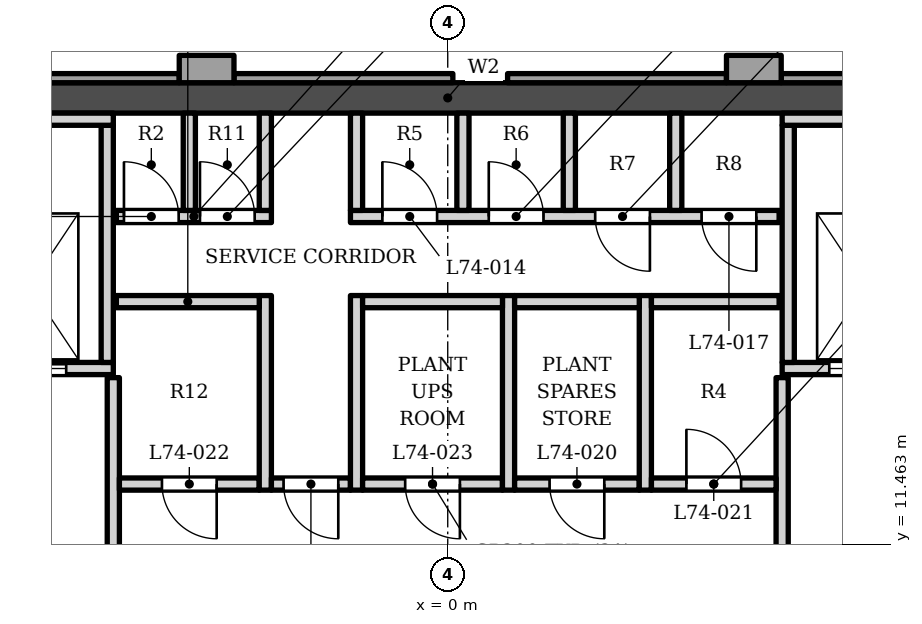
"""IFC4 building model, lengths in metres.
Left out: names, types, materials, properties, quantities, classifications, styles, units other than length and angle.
Written with IfcOpenShell. Run it as: python <this file> out.ifc"""

import sys

from ifc_helpers import new_model, si_unit, direction, frame, frame_2d, origin, place, context, subcontext, project, spatial, polyline, rectangle, outline, extrude, element, fill, save


model = new_model("IFC4")
c1 = context("Model", 3, precision=1e-05, world=origin(), true_north=direction((0.0, 1.0)))
c2 = subcontext(c1, "Body", "Model", "MODEL_VIEW")
j1 = project(units=[si_unit("LENGTHUNIT", "METRE"), si_unit("PLANEANGLEUNIT", "RADIAN")], contexts=[c1])
p1 = place(None, origin())
s1 = spatial("IfcSite", under=j1, at=p1, CompositionType="ELEMENT")
p2 = place(p1, origin())
s2 = spatial("IfcBuilding", under=s1, at=p2, CompositionType="ELEMENT")
p3 = place(p2, frame((0.0, 0.0, 315.5)))
s3 = spatial("IfcBuildingStorey", under=s2, at=p3, CompositionType="ELEMENT", Elevation=315.5)
p4 = place(p3, frame((-12.1, 18.802, 0.0), z_axis=(0.0, 0.0, 1.0), x_axis=(1.0, 0.0, 0.0)))
e1 = element("IfcWall", 1, at=p4, inside=s3, PredefinedType="SHEAR", context=c2, shape_type="SweptSolid", body=[
    extrude(rectangle(XDim=24.2, YDim=0.5, at=frame_2d((12.1, 0.0))), origin(), (0.0, 0.0, 1.0), 5.0),
])
p5 = place(p3, origin())
e2 = element("IfcWall", 2, at=p5, inside=s3, PredefinedType="SOLIDWALL", context=c2, shape_type="SweptSolid", body=[
    extrude(outline(polyline([(4.584, 19.502), (4.584, 19.052), (5.484, 19.052), (5.484, 19.502), (4.584, 19.502)])), origin(), (0.0, 0.0, 1.0), 3.8),
])
p6 = place(p3, origin())
e3 = element("IfcWall", 3, at=p6, inside=s3, PredefinedType="SOLIDWALL", context=c2, shape_type="SweptSolid", body=[
    extrude(outline(polyline([(-4.416, 19.502), (-4.416, 19.052), (-3.516, 19.052), (-3.516, 19.502), (-4.416, 19.502)])), origin(), (0.0, 0.0, 1.0), 3.8),
])
p7 = place(p3, origin())
e4 = element("IfcWall", 4, at=p7, inside=s3, PredefinedType="ELEMENTEDWALL", context=c2, shape_type="SweptSolid", body=[
    extrude(outline(polyline([(9.084, 19.203), (5.484, 19.203), (5.484, 19.052), (9.084, 19.052), (9.084, 19.203)])), origin(), (0.0, 0.0, 1.0), 3.8),
])
p8 = place(p3, origin())
e5 = element("IfcWall", 5, at=p8, inside=s3, PredefinedType="ELEMENTEDWALL", context=c2, shape_type="SweptSolid", body=[
    extrude(outline(polyline([(4.584, 19.203), (0.984, 19.203), (0.984, 19.052), (4.584, 19.052), (4.584, 19.203)])), origin(), (0.0, 0.0, 1.0), 3.8),
])
p9 = place(p3, origin())
e6 = element("IfcWall", 6, at=p9, inside=s3, PredefinedType="ELEMENTEDWALL", context=c2, shape_type="SweptSolid", body=[
    extrude(outline(polyline([(0.084, 19.203), (-3.516, 19.203), (-3.516, 19.052), (0.084, 19.052), (0.084, 19.203)])), origin(), (0.0, 0.0, 1.0), 3.8),
])
p10 = place(p3, origin())
e7 = element("IfcWall", 7, at=p10, inside=s3, PredefinedType="ELEMENTEDWALL", context=c2, shape_type="SweptSolid", body=[
    extrude(outline(polyline([(-4.416, 19.203), (-8.016, 19.203), (-8.016, 19.052), (-4.416, 19.052), (-4.416, 19.203)])), origin(), (0.0, 0.0, 1.0), 3.8),
])
p11 = place(p3, frame((-5.5, 6.353, 0.0), z_axis=(0.0, 0.0, 1.0), x_axis=(0.0, 1.0, 0.0)))
e8 = element("IfcWall", 8, at=p11, inside=s3, PredefinedType="SOLIDWALL", context=c2, shape_type="SweptSolid", body=[
    extrude(rectangle(XDim=7.85, YDim=0.2, at=frame_2d((3.925, 0.0))), origin(), (0.0, 0.0, 1.0), 4.8),
])
p12 = place(p11, frame((3.6, 0.0, 0.0)))
e9 = element("IfcOpeningElement", 9, at=p12, cuts=e8, PredefinedType="OPENING", context=c2, shape_type="SweptSolid", body=[
    extrude(rectangle(XDim=1.4, YDim=2.1, at=frame_2d((0.7, 1.05))), frame((0.0, 0.11, 0.0), z_axis=(0.0, -1.0, 0.0), x_axis=(1.0, 0.0, 0.0)), (0.0, 0.0, 1.0), 0.22),
])
p13 = place(p3, frame((5.5, 6.353, 0.0), z_axis=(0.0, 0.0, 1.0), x_axis=(0.0, 1.0, 0.0)))
e10 = element("IfcWall", 10, at=p13, inside=s3, PredefinedType="SOLIDWALL", context=c2, shape_type="SweptSolid", body=[
    extrude(rectangle(XDim=7.85, YDim=0.2, at=frame_2d((3.925, 0.0))), origin(), (0.0, 0.0, 1.0), 4.8),
])
p14 = place(p13, frame((3.6, 0.0, 0.0)))
e11 = element("IfcOpeningElement", 11, at=p14, cuts=e10, PredefinedType="OPENING", context=c2, shape_type="SweptSolid", body=[
    extrude(rectangle(XDim=1.4, YDim=2.1, at=frame_2d((0.7, 1.05))), frame((0.0, 0.11, 0.0), z_axis=(0.0, -1.0, 0.0), x_axis=(1.0, 0.0, 0.0)), (0.0, 0.0, 1.0), 0.22),
])
p15 = place(p3, frame((-5.4, 12.453, 0.0), z_axis=(0.0, 0.0, 1.0), x_axis=(1.0, 0.0, 0.0)))
e12 = element("IfcWall", 12, at=p15, inside=s3, PredefinedType="PARTITIONING", context=c2, shape_type="SweptSolid", body=[
    extrude(rectangle(XDim=2.3, YDim=0.2, at=frame_2d((1.15, 0.0))), origin(), (0.0, 0.0, 1.0), 4.8),
])
p16 = place(p15, frame((0.7, 0.0, 0.0)))
e13 = element("IfcOpeningElement", 13, at=p16, cuts=e12, PredefinedType="OPENING", context=c2, shape_type="SweptSolid", body=[
    extrude(rectangle(XDim=0.9, YDim=2.1, at=frame_2d((0.45, 1.05))), frame((0.0, 0.11, 0.0), z_axis=(0.0, -1.0, 0.0), x_axis=(1.0, 0.0, 0.0)), (0.0, 0.0, 1.0), 0.22),
])
p17 = place(p3, frame((-3.0, 12.353, 0.0), z_axis=(0.0, 0.0, 1.0), x_axis=(0.0, 1.0, 0.0)))
e14 = element("IfcWall", 14, at=p17, inside=s3, PredefinedType="PARTITIONING", context=c2, shape_type="SweptSolid", body=[
    extrude(rectangle(XDim=3.2, YDim=0.2, at=frame_2d((1.6, 0.0))), origin(), (0.0, 0.0, 1.0), 4.8),
])
p18 = place(p3, frame((-2.9, 12.453, 0.0), z_axis=(0.0, 0.0, 1.0), x_axis=(1.0, 0.0, 0.0)))
e15 = element("IfcWall", 15, at=p18, inside=s3, PredefinedType="PARTITIONING", context=c2, shape_type="SweptSolid", body=[
    extrude(rectangle(XDim=1.3, YDim=0.2, at=frame_2d((0.65, 0.0))), origin(), (0.0, 0.0, 1.0), 4.8),
])
p19 = place(p18, frame((0.2, 0.0, 0.0)))
e16 = element("IfcOpeningElement", 16, at=p19, cuts=e15, PredefinedType="OPENING", context=c2, shape_type="SweptSolid", body=[
    extrude(rectangle(XDim=0.9, YDim=2.1, at=frame_2d((0.45, 1.05))), frame((0.0, 0.11, 0.0), z_axis=(0.0, -1.0, 0.0), x_axis=(1.0, 0.0, 0.0)), (0.0, 0.0, 1.0), 0.22),
])
p20 = place(p3, frame((-1.5, 12.353, 0.0), z_axis=(0.0, 0.0, 1.0), x_axis=(0.0, 1.0, 0.0)))
e17 = element("IfcWall", 17, at=p20, inside=s3, PredefinedType="PARTITIONING", context=c2, shape_type="SweptSolid", body=[
    extrude(rectangle(XDim=3.2, YDim=0.2, at=frame_2d((1.6, 0.0))), origin(), (0.0, 0.0, 1.0), 4.8),
])
p21 = place(p3, frame((-1.4, 12.453, 0.0), z_axis=(0.0, 0.0, 1.0), x_axis=(1.0, 0.0, 0.0)))
e18 = element("IfcWall", 18, at=p21, inside=s3, PredefinedType="PARTITIONING", context=c2, shape_type="SweptSolid", body=[
    extrude(rectangle(XDim=2.3, YDim=0.2, at=frame_2d((1.15, 0.0))), origin(), (0.0, 0.0, 1.0), 4.8),
])
p22 = place(p21, frame((0.7, 0.0, 0.0)))
e19 = element("IfcOpeningElement", 19, at=p22, cuts=e18, PredefinedType="OPENING", context=c2, shape_type="SweptSolid", body=[
    extrude(rectangle(XDim=0.9, YDim=2.1, at=frame_2d((0.45, 1.05))), frame((0.0, 0.11, 0.0), z_axis=(0.0, -1.0, 0.0), x_axis=(1.0, 0.0, 0.0)), (0.0, 0.0, 1.0), 0.22),
])
p23 = place(p3, frame((1.0, 12.353, 0.0), z_axis=(0.0, 0.0, 1.0), x_axis=(0.0, 1.0, 0.0)))
e20 = element("IfcWall", 20, at=p23, inside=s3, PredefinedType="PARTITIONING", context=c2, shape_type="SweptSolid", body=[
    extrude(rectangle(XDim=3.2, YDim=0.2, at=frame_2d((1.6, 0.0))), origin(), (0.0, 0.0, 1.0), 4.8),
])
p24 = place(p3, frame((1.1, 12.453, 0.0), z_axis=(0.0, 0.0, 1.0), x_axis=(1.0, 0.0, 0.0)))
e21 = element("IfcWall", 21, at=p24, inside=s3, PredefinedType="PARTITIONING", context=c2, shape_type="SweptSolid", body=[
    extrude(rectangle(XDim=2.05, YDim=0.2, at=frame_2d((1.025, 0.0))), origin(), (0.0, 0.0, 1.0), 4.8),
])
p25 = place(p24, frame((0.575, 0.0, 0.0)))
e22 = element("IfcOpeningElement", 22, at=p25, cuts=e21, PredefinedType="OPENING", context=c2, shape_type="SweptSolid", body=[
    extrude(rectangle(XDim=0.9, YDim=2.1, at=frame_2d((0.45, 1.05))), frame((0.0, 0.11, 0.0), z_axis=(0.0, -1.0, 0.0), x_axis=(1.0, 0.0, 0.0)), (0.0, 0.0, 1.0), 0.22),
])
p26 = place(p3, frame((3.25, 12.353, 0.0), z_axis=(0.0, 0.0, 1.0), x_axis=(0.0, 1.0, 0.0)))
e23 = element("IfcWall", 23, at=p26, inside=s3, PredefinedType="PARTITIONING", context=c2, shape_type="SweptSolid", body=[
    extrude(rectangle(XDim=3.2, YDim=0.2, at=frame_2d((1.6, 0.0))), origin(), (0.0, 0.0, 1.0), 4.8),
])
p27 = place(p3, frame((3.35, 12.453, 0.0), z_axis=(0.0, 0.0, 1.0), x_axis=(1.0, 0.0, 0.0)))
e24 = element("IfcWall", 24, at=p27, inside=s3, PredefinedType="PARTITIONING", context=c2, shape_type="SweptSolid", body=[
    extrude(rectangle(XDim=2.05, YDim=0.2, at=frame_2d((1.025, 0.0))), origin(), (0.0, 0.0, 1.0), 4.8),
])
p28 = place(p27, frame((0.575, 0.0, 0.0)))
e25 = element("IfcOpeningElement", 25, at=p28, cuts=e24, PredefinedType="OPENING", context=c2, shape_type="SweptSolid", body=[
    extrude(rectangle(XDim=0.9, YDim=2.1, at=frame_2d((0.45, 1.05))), frame((0.0, 0.11, 0.0), z_axis=(0.0, -1.0, 0.0), x_axis=(1.0, 0.0, 0.0)), (0.0, 0.0, 1.0), 0.22),
])
p29 = place(p3, frame((-8.05, 14.353, 0.0), z_axis=(0.0, 0.0, 1.0), x_axis=(1.0, 0.0, 0.0)))
e26 = element("IfcWall", 26, at=p29, inside=s3, PredefinedType="SOLIDWALL", context=c2, shape_type="SweptSolid", body=[
    extrude(rectangle(XDim=2.55, YDim=0.2, at=frame_2d((1.275, 0.0))), origin(), (0.0, 0.0, 1.0), 4.8),
])
p30 = place(p29, frame((0.575, 0.0, 0.0)))
e27 = element("IfcOpeningElement", 27, at=p30, cuts=e26, PredefinedType="OPENING", context=c2, shape_type="SweptSolid", body=[
    extrude(rectangle(XDim=1.2, YDim=2.1, at=frame_2d((0.6, 1.05))), frame((0.0, 0.11, 0.0), z_axis=(0.0, -1.0, 0.0), x_axis=(1.0, 0.0, 0.0)), (0.0, 0.0, 1.0), 0.22),
])
p31 = place(p3, frame((5.5, 14.353, 0.0), z_axis=(0.0, 0.0, 1.0), x_axis=(1.0, 0.0, 0.0)))
e28 = element("IfcWall", 28, at=p31, inside=s3, PredefinedType="SOLIDWALL", context=c2, shape_type="SweptSolid", body=[
    extrude(rectangle(XDim=2.55, YDim=0.2, at=frame_2d((1.275, 0.0))), origin(), (0.0, 0.0, 1.0), 4.8),
])
p32 = place(p31, frame((0.775, 0.0, 0.0)))
e29 = element("IfcOpeningElement", 29, at=p32, cuts=e28, PredefinedType="OPENING", context=c2, shape_type="SweptSolid", body=[
    extrude(rectangle(XDim=1.2, YDim=2.1, at=frame_2d((0.6, 1.05))), frame((0.0, 0.11, 0.0), z_axis=(0.0, -1.0, 0.0), x_axis=(1.0, 0.0, 0.0)), (0.0, 0.0, 1.0), 0.22),
])
for number, where, z_axis, x_axis in (
    (30, (-5.6, 14.453, 0.0), (0.0, 0.0, 1.0), (0.0, 1.0, 0.0)),
    (31, (5.6, 14.453, 0.0), (0.0, 0.0, 1.0), (0.0, 1.0, 0.0)),
):
    element("IfcWall", number, at=place(p3, frame(where, z_axis=z_axis, x_axis=x_axis)), inside=s3, PredefinedType="SOLIDWALL", context=c2, shape_type="SweptSolid", body=[
        extrude(rectangle(XDim=3.9, YDim=0.2, at=frame_2d((1.95, 0.0))), origin(), (0.0, 0.0, 1.0), 4.8),
    ])
p33 = place(p3, frame((-5.45, 15.453, 0.0), z_axis=(0.0, 0.0, 1.0), x_axis=(1.0, 0.0, 0.0)))
e32 = element("IfcWall", 32, at=p33, inside=s3, PredefinedType="SOLIDWALL", context=c2, shape_type="SweptSolid", body=[
    extrude(rectangle(XDim=2.35, YDim=0.2, at=frame_2d((1.175, 0.0))), origin(), (0.0, 0.0, 1.0), 4.8),
])
p34 = place(p3, frame((-1.4, 15.453, 0.0), z_axis=(0.0, 0.0, 1.0), x_axis=(1.0, 0.0, 0.0)))
e33 = element("IfcWall", 33, at=p34, inside=s3, PredefinedType="PARTITIONING", context=c2, shape_type="SweptSolid", body=[
    extrude(rectangle(XDim=2.3, YDim=0.2, at=frame_2d((1.15, 0.0))), origin(), (0.0, 0.0, 1.0), 4.8),
])
p35 = place(p3, frame((1.1, 15.453, 0.0), z_axis=(0.0, 0.0, 1.0), x_axis=(1.0, 0.0, 0.0)))
e34 = element("IfcWall", 34, at=p35, inside=s3, PredefinedType="PARTITIONING", context=c2, shape_type="SweptSolid", body=[
    extrude(rectangle(XDim=2.05, YDim=0.2, at=frame_2d((1.025, 0.0))), origin(), (0.0, 0.0, 1.0), 4.8),
])
p36 = place(p3, frame((3.35, 15.453, 0.0), z_axis=(0.0, 0.0, 1.0), x_axis=(1.0, 0.0, 0.0)))
e35 = element("IfcWall", 35, at=p36, inside=s3, PredefinedType="SOLIDWALL", context=c2, shape_type="SweptSolid", body=[
    extrude(rectangle(XDim=2.1, YDim=0.2, at=frame_2d((1.05, 0.0))), origin(), (0.0, 0.0, 1.0), 4.8),
])
p37 = place(p3, frame((-5.45, 16.853, 0.0), z_axis=(0.0, 0.0, 1.0), x_axis=(1.0, 0.0, 0.0)))
e36 = element("IfcWall", 36, at=p37, inside=s3, PredefinedType="SOLIDWALL", context=c2, shape_type="SweptSolid", body=[
    extrude(rectangle(XDim=2.55, YDim=0.2, at=frame_2d((1.275, 0.0))), origin(), (0.0, 0.0, 1.0), 4.8),
])
p38 = place(p37, frame((0.125, 0.0, 0.0)))
e37 = element("IfcOpeningElement", 37, at=p38, cuts=e36, PredefinedType="OPENING", context=c2, shape_type="SweptSolid", body=[
    extrude(rectangle(XDim=0.9, YDim=2.1, at=frame_2d((0.45, 1.05))), frame((0.0, 0.11, 0.0), z_axis=(0.0, -1.0, 0.0), x_axis=(1.0, 0.0, 0.0)), (0.0, 0.0, 1.0), 0.22),
])
p39 = place(p37, frame((1.375, 0.0, 0.0)))
e38 = element("IfcOpeningElement", 38, at=p39, cuts=e36, PredefinedType="OPENING", context=c2, shape_type="SweptSolid", body=[
    extrude(rectangle(XDim=0.9, YDim=2.1, at=frame_2d((0.45, 1.05))), frame((0.0, 0.11, 0.0), z_axis=(0.0, -1.0, 0.0), x_axis=(1.0, 0.0, 0.0)), (0.0, 0.0, 1.0), 0.22),
])
p40 = place(p3, frame((-1.6, 16.853, 0.0), z_axis=(0.0, 0.0, 1.0), x_axis=(1.0, 0.0, 0.0)))
e39 = element("IfcWall", 39, at=p40, inside=s3, PredefinedType="SOLIDWALL", context=c2, shape_type="SweptSolid", body=[
    extrude(rectangle(XDim=7.05, YDim=0.2, at=frame_2d((3.525, 0.0))), origin(), (0.0, 0.0, 1.0), 4.8),
])
p41 = place(p40, frame((0.525, 0.0, 0.0)))
e40 = element("IfcOpeningElement", 40, at=p41, cuts=e39, PredefinedType="OPENING", context=c2, shape_type="SweptSolid", body=[
    extrude(rectangle(XDim=0.9, YDim=2.1, at=frame_2d((0.45, 1.05))), frame((0.0, 0.11, 0.0), z_axis=(0.0, -1.0, 0.0), x_axis=(1.0, 0.0, 0.0)), (0.0, 0.0, 1.0), 0.22),
])
p42 = place(p40, frame((2.275, 0.0, 0.0)))
e41 = element("IfcOpeningElement", 41, at=p42, cuts=e39, PredefinedType="OPENING", context=c2, shape_type="SweptSolid", body=[
    extrude(rectangle(XDim=0.9, YDim=2.1, at=frame_2d((0.45, 1.05))), frame((0.0, 0.11, 0.0), z_axis=(0.0, -1.0, 0.0), x_axis=(1.0, 0.0, 0.0)), (0.0, 0.0, 1.0), 0.22),
])
p43 = place(p40, frame((4.025, 0.0, 0.0)))
e42 = element("IfcOpeningElement", 42, at=p43, cuts=e39, PredefinedType="OPENING", context=c2, shape_type="SweptSolid", body=[
    extrude(rectangle(XDim=0.9, YDim=2.1, at=frame_2d((0.45, 1.05))), frame((0.0, 0.11, 0.0), z_axis=(0.0, -1.0, 0.0), x_axis=(1.0, 0.0, 0.0)), (0.0, 0.0, 1.0), 0.22),
])
p44 = place(p40, frame((5.775, 0.0, 0.0)))
e43 = element("IfcOpeningElement", 43, at=p44, cuts=e39, PredefinedType="OPENING", context=c2, shape_type="SweptSolid", body=[
    extrude(rectangle(XDim=0.9, YDim=2.1, at=frame_2d((0.45, 1.05))), frame((0.0, 0.11, 0.0), z_axis=(0.0, -1.0, 0.0), x_axis=(1.0, 0.0, 0.0)), (0.0, 0.0, 1.0), 0.22),
])
for number, where, z_axis, x_axis in (
    (44, (-4.25, 16.953, 0.0), (0.0, 0.0, 1.0), (0.0, 1.0, 0.0)),
    (45, (-3.0, 16.953, 0.0), (0.0, 0.0, 1.0), (0.0, 1.0, 0.0)),
    (46, (-1.5, 16.953, 0.0), (0.0, 0.0, 1.0), (0.0, 1.0, 0.0)),
    (47, (0.25, 16.953, 0.0), (0.0, 0.0, 1.0), (0.0, 1.0, 0.0)),
    (48, (2.0, 16.953, 0.0), (0.0, 0.0, 1.0), (0.0, 1.0, 0.0)),
    (49, (3.75, 16.953, 0.0), (0.0, 0.0, 1.0), (0.0, 1.0, 0.0)),
):
    element("IfcWall", number, at=place(p3, frame(where, z_axis=z_axis, x_axis=x_axis)), inside=s3, PredefinedType="PARTITIONING", context=c2, shape_type="SweptSolid", body=[
        extrude(rectangle(XDim=1.6, YDim=0.2, at=frame_2d((0.8, 0.0))), origin(), (0.0, 0.0, 1.0), 4.8),
    ])
for number, where, z_axis, x_axis in (
    (50, (-8.05, 18.453, 0.0), (0.0, 0.0, 1.0), (1.0, 0.0, 0.0)),
    (51, (5.5, 18.453, 0.0), (0.0, 0.0, 1.0), (1.0, 0.0, 0.0)),
):
    element("IfcWall", number, at=place(p3, frame(where, z_axis=z_axis, x_axis=x_axis)), inside=s3, PredefinedType="SOLIDWALL", context=c2, shape_type="SweptSolid", body=[
        extrude(rectangle(XDim=2.55, YDim=0.2, at=frame_2d((1.275, 0.0))), origin(), (0.0, 0.0, 1.0), 4.8),
    ])
p45 = place(p30, origin())
e52 = element("IfcDoor", 52, at=p45, inside=s3, OperationType="DOUBLE_DOOR_SLIDING", PredefinedType="DOOR", context=c2, shape_type="SweptSolid", body=[
    extrude(rectangle(XDim=1.2, YDim=2.1, at=frame_2d((0.6, 1.05))), frame((0.0, 0.025, 0.0), z_axis=(0.0, -1.0, 0.0), x_axis=(1.0, 0.0, 0.0)), (0.0, 0.0, 1.0), 0.05),
])
fill(e27, e52)
p46 = place(p32, origin())
e53 = element("IfcDoor", 53, at=p46, inside=s3, OperationType="DOUBLE_DOOR_SLIDING", PredefinedType="DOOR", context=c2, shape_type="SweptSolid", body=[
    extrude(rectangle(XDim=1.2, YDim=2.1, at=frame_2d((0.6, 1.05))), frame((0.0, 0.025, 0.0), z_axis=(0.0, -1.0, 0.0), x_axis=(1.0, 0.0, 0.0)), (0.0, 0.0, 1.0), 0.05),
])
fill(e29, e53)
p47 = place(p19, origin())
e54 = element("IfcDoor", 54, at=p47, inside=s3, OperationType="SINGLE_SWING_RIGHT", PredefinedType="DOOR", context=c2, shape_type="SweptSolid", body=[
    extrude(rectangle(XDim=0.9, YDim=2.1, at=frame_2d((0.45, 1.05))), frame((0.0, 0.025, 0.0), z_axis=(0.0, -1.0, 0.0), x_axis=(1.0, 0.0, 0.0)), (0.0, 0.0, 1.0), 0.05),
])
fill(e16, e54)
p48 = place(p38, origin())
e55 = element("IfcDoor", 55, at=p48, inside=s3, OperationType="SINGLE_SWING_LEFT", PredefinedType="DOOR", context=c2, shape_type="SweptSolid", body=[
    extrude(rectangle(XDim=0.9, YDim=2.1, at=frame_2d((0.45, 1.05))), frame((0.0, 0.025, 0.0), z_axis=(0.0, -1.0, 0.0), x_axis=(1.0, 0.0, 0.0)), (0.0, 0.0, 1.0), 0.05),
])
fill(e37, e55)
p49 = place(p39, origin())
e56 = element("IfcDoor", 56, at=p49, inside=s3, OperationType="SINGLE_SWING_LEFT", PredefinedType="DOOR", context=c2, shape_type="SweptSolid", body=[
    extrude(rectangle(XDim=0.9, YDim=2.1, at=frame_2d((0.45, 1.05))), frame((0.0, 0.025, 0.0), z_axis=(0.0, -1.0, 0.0), x_axis=(1.0, 0.0, 0.0)), (0.0, 0.0, 1.0), 0.05),
])
fill(e38, e56)
p50 = place(p41, origin())
e57 = element("IfcDoor", 57, at=p50, inside=s3, OperationType="SINGLE_SWING_LEFT", PredefinedType="DOOR", context=c2, shape_type="SweptSolid", body=[
    extrude(rectangle(XDim=0.9, YDim=2.1, at=frame_2d((0.45, 1.05))), frame((0.0, 0.025, 0.0), z_axis=(0.0, -1.0, 0.0), x_axis=(1.0, 0.0, 0.0)), (0.0, 0.0, 1.0), 0.05),
])
fill(e40, e57)
p51 = place(p42, origin())
e58 = element("IfcDoor", 58, at=p51, inside=s3, OperationType="SINGLE_SWING_LEFT", PredefinedType="DOOR", context=c2, shape_type="SweptSolid", body=[
    extrude(rectangle(XDim=0.9, YDim=2.1, at=frame_2d((0.45, 1.05))), frame((0.0, 0.025, 0.0), z_axis=(0.0, -1.0, 0.0), x_axis=(1.0, 0.0, 0.0)), (0.0, 0.0, 1.0), 0.05),
])
fill(e41, e58)
p52 = place(p43, origin())
e59 = element("IfcDoor", 59, at=p52, inside=s3, OperationType="SINGLE_SWING_RIGHT", PredefinedType="DOOR", context=c2, shape_type="SweptSolid", body=[
    extrude(rectangle(XDim=0.9, YDim=2.1, at=frame_2d((0.45, 1.05))), frame((0.0, 0.025, 0.0), z_axis=(0.0, -1.0, 0.0), x_axis=(1.0, 0.0, 0.0)), (0.0, 0.0, 1.0), 0.05),
])
fill(e42, e59)
p53 = place(p44, origin())
e60 = element("IfcDoor", 60, at=p53, inside=s3, OperationType="SINGLE_SWING_RIGHT", PredefinedType="DOOR", context=c2, shape_type="SweptSolid", body=[
    extrude(rectangle(XDim=0.9, YDim=2.1, at=frame_2d((0.45, 1.05))), frame((0.0, 0.025, 0.0), z_axis=(0.0, -1.0, 0.0), x_axis=(1.0, 0.0, 0.0)), (0.0, 0.0, 1.0), 0.05),
])
fill(e43, e60)
p54 = place(p25, origin())
e61 = element("IfcDoor", 61, at=p54, inside=s3, OperationType="SINGLE_SWING_RIGHT", PredefinedType="DOOR", context=c2, shape_type="SweptSolid", body=[
    extrude(rectangle(XDim=0.9, YDim=2.1, at=frame_2d((0.45, 1.05))), frame((0.0, 0.025, 0.0), z_axis=(0.0, -1.0, 0.0), x_axis=(1.0, 0.0, 0.0)), (0.0, 0.0, 1.0), 0.05),
])
fill(e22, e61)
p55 = place(p28, origin())
e62 = element("IfcDoor", 62, at=p55, inside=s3, OperationType="SINGLE_SWING_LEFT", PredefinedType="DOOR", context=c2, shape_type="SweptSolid", body=[
    extrude(rectangle(XDim=0.9, YDim=2.1, at=frame_2d((0.45, 1.05))), frame((0.0, 0.025, 0.0), z_axis=(0.0, -1.0, 0.0), x_axis=(1.0, 0.0, 0.0)), (0.0, 0.0, 1.0), 0.05),
])
fill(e25, e62)
p56 = place(p16, origin())
e63 = element("IfcDoor", 63, at=p56, inside=s3, OperationType="SINGLE_SWING_RIGHT", PredefinedType="DOOR", context=c2, shape_type="SweptSolid", body=[
    extrude(rectangle(XDim=0.9, YDim=2.1, at=frame_2d((0.45, 1.05))), frame((0.0, 0.025, 0.0), z_axis=(0.0, -1.0, 0.0), x_axis=(1.0, 0.0, 0.0)), (0.0, 0.0, 1.0), 0.05),
])
fill(e13, e63)
p57 = place(p22, origin())
e64 = element("IfcDoor", 64, at=p57, inside=s3, OperationType="SINGLE_SWING_RIGHT", PredefinedType="DOOR", context=c2, shape_type="SweptSolid", body=[
    extrude(rectangle(XDim=0.9, YDim=2.1, at=frame_2d((0.45, 1.05))), frame((0.0, 0.025, 0.0), z_axis=(0.0, -1.0, 0.0), x_axis=(1.0, 0.0, 0.0)), (0.0, 0.0, 1.0), 0.05),
])
fill(e19, e64)
save(model, sys.argv[1])
